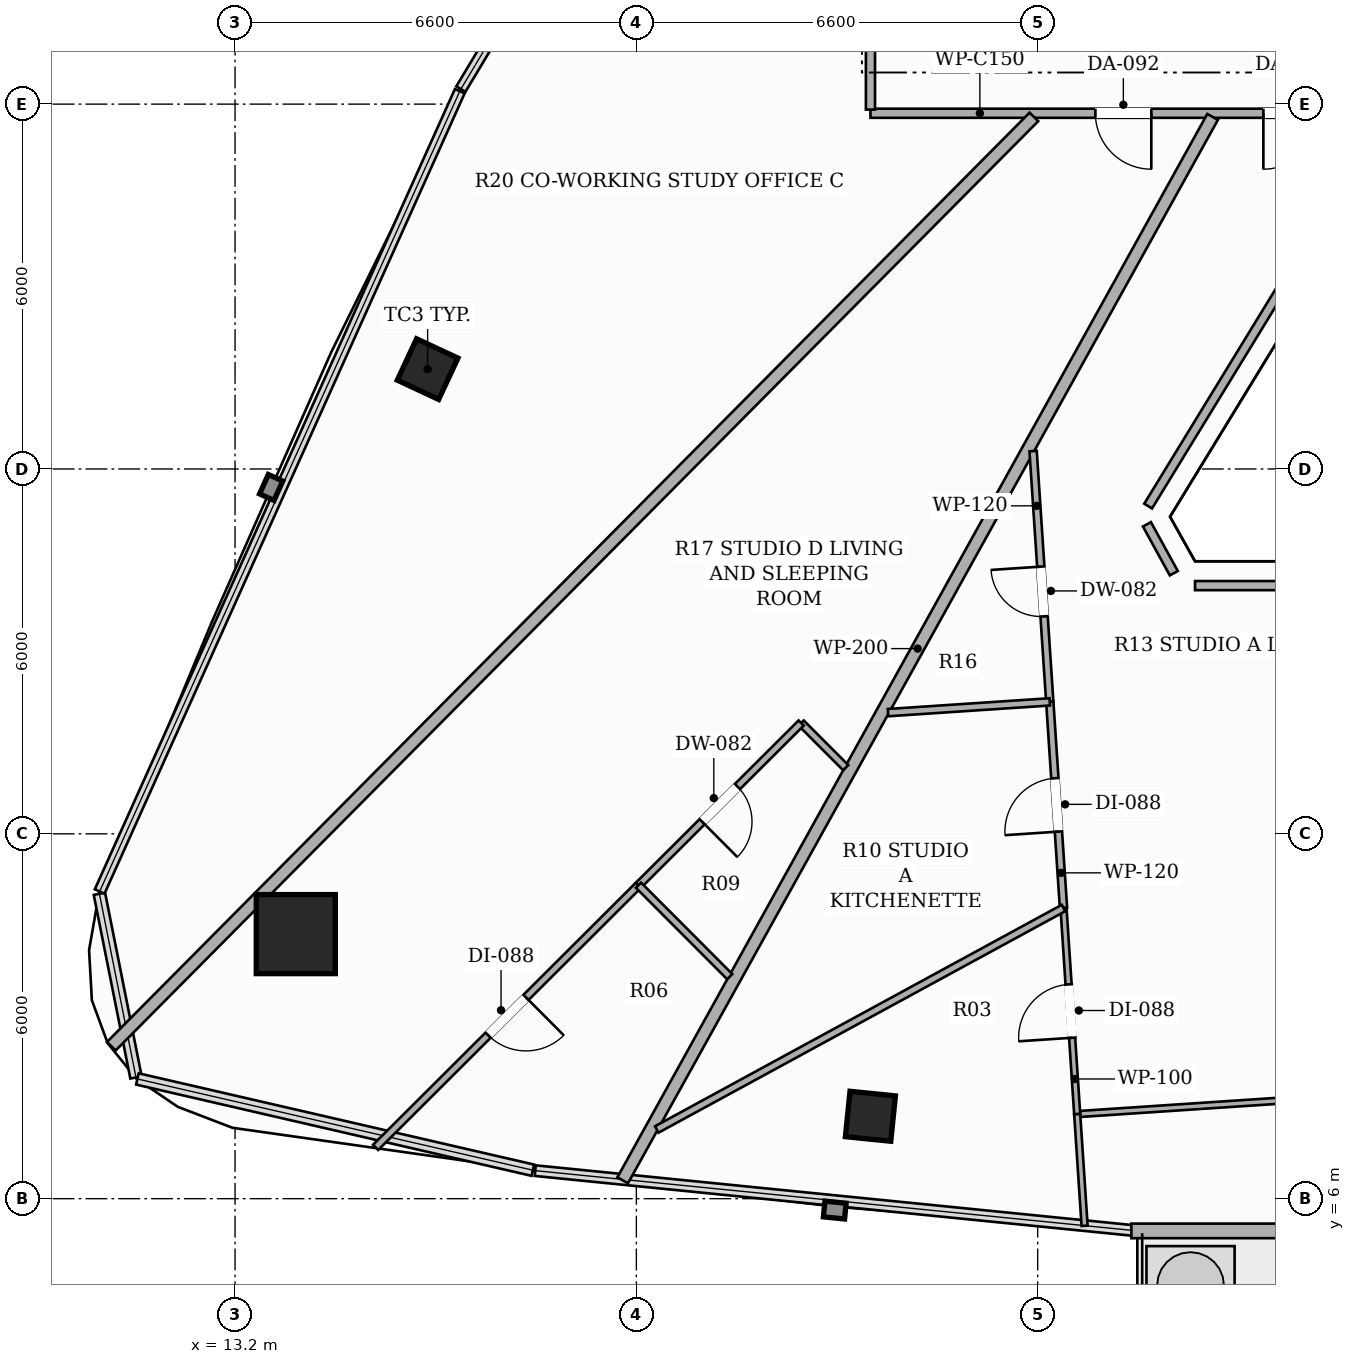
"""IFC4 building model, lengths in metres.
Left out: names, types, materials, properties, quantities, classifications, styles, units other than length and angle.
Written with IfcOpenShell. Run it as: python <this file> out.ifc"""

import sys

from ifc_helpers import new_model, si_unit, direction, frame, frame_2d, origin, origin_2d, place, context, subcontext, project, spatial, rectangle, hollow_rectangle, extrude, element, fill, save


model = new_model("IFC4")
c1 = context("Model", 3, precision=1e-05, world=origin(), true_north=direction((0.0, 1.0)))
c2 = subcontext(c1, "Body", "Model", "MODEL_VIEW")
j1 = project(units=[si_unit("LENGTHUNIT", "METRE"), si_unit("PLANEANGLEUNIT", "RADIAN")], contexts=[c1])
p1 = place(None, origin())
s1 = spatial("IfcSite", under=j1, at=p1, CompositionType="ELEMENT")
p2 = place(p1, origin())
s2 = spatial("IfcBuilding", under=s1, at=p2, CompositionType="ELEMENT")
p3 = place(p2, frame((0.0, 0.0, 253.55)))
s3 = spatial("IfcBuildingStorey", under=s2, at=p3, CompositionType="ELEMENT", Elevation=253.55)
p4 = place(p3, frame((14.199, 10.351, 0.0), z_axis=(0.0, 0.0, 1.0), x_axis=(1.0, 0.0, 0.0)))
e1 = element("IfcColumn", 1, at=p4, inside=s3, PredefinedType="COLUMN", context=c2, shape_type="SweptSolid", body=[
    extrude(hollow_rectangle(XDim=1.3, YDim=1.3, WallThickness=0.04, at=origin_2d()), origin(), (0.0, 0.0, 1.0), 3.3),
])
for number, where, z_axis, x_axis in (
    (2, (16.367, 19.642, 0.0), (0.0, 0.0, 1.0), (0.423, 0.906, 0.0)),
    (3, (23.649, 7.355, 0.0), (0.0, 0.0, 1.0), (-0.995, 0.101, 0.0)),
):
    element("IfcColumn", number, at=place(p3, frame(where, z_axis=z_axis, x_axis=x_axis)), inside=s3, PredefinedType="COLUMN", context=c2, shape_type="SweptSolid", body=[
        extrude(hollow_rectangle(XDim=0.75, YDim=0.75, WallThickness=0.025, at=origin_2d()), origin(), (0.0, 0.0, 1.0), 3.3),
    ])
p5 = place(p3, frame((27.941, 5.47, 0.0), z_axis=(0.0, 0.0, 1.0), x_axis=(1.0, 0.0, 0.0)))
e4 = element("IfcWall", 4, at=p5, inside=s3, PredefinedType="SOLIDWALL", context=c2, shape_type="SweptSolid", body=[
    extrude(rectangle(XDim=10.118, YDim=0.24, at=frame_2d((5.059, 0.0))), origin(), (0.0, 0.0, 1.0), 2.464),
])
p6 = place(p5, frame((7.62, 0.0, 0.0)))
e5 = element("IfcOpeningElement", 5, at=p6, cuts=e4, PredefinedType="OPENING", context=c2, shape_type="SweptSolid", body=[
    extrude(rectangle(XDim=1.8, YDim=2.2, at=frame_2d((0.9, 1.1))), frame((0.0, 0.13, 0.0), z_axis=(0.0, -1.0, 0.0), x_axis=(1.0, 0.0, 0.0)), (0.0, 0.0, 1.0), 0.26),
])
p7 = place(p3, frame((32.165, 23.85, 0.0), z_axis=(0.0, 0.0, 1.0), x_axis=(-1.0, 0.0, 0.0)))
e6 = element("IfcWall", 6, at=p7, inside=s3, PredefinedType="PARTITIONING", context=c2, shape_type="SweptSolid", body=[
    extrude(rectangle(XDim=8.515, YDim=0.15, at=frame_2d((4.258, 0.0))), origin(), (0.0, 0.0, 1.0), 2.405),
])
p8 = place(p7, frame((1.133, 0.0, 0.0)))
e7 = element("IfcOpeningElement", 7, at=p8, cuts=e6, PredefinedType="OPENING", context=c2, shape_type="SweptSolid", body=[
    extrude(rectangle(XDim=0.92, YDim=2.15, at=frame_2d((0.46, 1.075))), frame((0.0, 0.085, 0.0), z_axis=(0.0, -1.0, 0.0), x_axis=(1.0, 0.0, 0.0)), (0.0, 0.0, 1.0), 0.17),
])
p9 = place(p7, frame((3.896, 0.0, 0.0)))
e8 = element("IfcOpeningElement", 8, at=p9, cuts=e6, PredefinedType="OPENING", context=c2, shape_type="SweptSolid", body=[
    extrude(rectangle(XDim=0.92, YDim=2.15, at=frame_2d((0.46, 1.075))), frame((0.0, 0.085, 0.0), z_axis=(0.0, -1.0, 0.0), x_axis=(1.0, 0.0, 0.0)), (0.0, 0.0, 1.0), 0.17),
])
p10 = place(p3, frame((23.65, 23.91, 0.0), z_axis=(0.0, 0.0, 1.0), x_axis=(0.0, 1.0, 0.0)))
e9 = element("IfcWall", 9, at=p10, inside=s3, PredefinedType="PARTITIONING", context=c2, shape_type="SweptSolid", body=[
    extrude(rectangle(XDim=11.059, YDim=0.15, at=frame_2d((5.53, 0.0))), origin(), (0.0, 0.0, 1.0), 2.332),
])
p11 = place(p10, frame((5.09, 0.0, 0.0)))
e10 = element("IfcOpeningElement", 10, at=p11, cuts=e9, PredefinedType="OPENING", context=c2, shape_type="SweptSolid", body=[
    extrude(rectangle(XDim=0.88, YDim=2.1, at=frame_2d((0.44, 1.05))), frame((0.0, 0.085, 0.0), z_axis=(0.0, -1.0, 0.0), x_axis=(1.0, 0.0, 0.0)), (0.0, 0.0, 1.0), 0.17),
])
p12 = place(p3, frame((37.012, 16.082, 0.0), z_axis=(0.0, 0.0, 1.0), x_axis=(-1.0, 0.0, 0.0)))
e11 = element("IfcWall", 11, at=p12, inside=s3, PredefinedType="PARTITIONING", context=c2, shape_type="SweptSolid", body=[
    extrude(rectangle(XDim=8.024, YDim=0.15, at=frame_2d((4.012, 0.0))), origin(), (0.0, 0.0, 1.0), 2.613),
])
p13 = place(p3, frame((28.639, 16.286, 0.0), z_axis=(0.0, 0.0, 1.0), x_axis=(-0.481571453054, 0.876406832244, 0.0)))
e12 = element("IfcWall", 12, at=p13, inside=s3, PredefinedType="PARTITIONING", context=c2, shape_type="SweptSolid", body=[
    extrude(rectangle(XDim=0.918, YDim=0.15, at=frame_2d((0.459, 0.0))), origin(), (0.0, 0.0, 1.0), 2.9),
])
p14 = place(p3, frame((28.217, 17.39, 0.0), z_axis=(0.0, 0.0, 1.0), x_axis=(0.522011859837, 0.852938226479, 0.0)))
e13 = element("IfcWall", 13, at=p14, inside=s3, PredefinedType="PARTITIONING", context=c2, shape_type="SweptSolid", body=[
    extrude(rectangle(XDim=7.504, YDim=0.15, at=frame_2d((3.752, 0.0))), origin(), (0.0, 0.0, 1.0), 2.613),
])
p15 = place(p3, frame((19.575, 6.302, 0.0), z_axis=(0.0, 0.0, 1.0), x_axis=(0.485129783088, 0.874442161358, 0.0)))
e14 = element("IfcWall", 14, at=p15, inside=s3, PredefinedType="PARTITIONING", context=c2, shape_type="SweptSolid", body=[
    extrude(rectangle(XDim=19.999, YDim=0.2, at=frame_2d((10.0, 0.0))), origin(), (0.0, 0.0, 1.0), 2.332),
])
p16 = place(p3, frame((26.338, 23.79, 0.0), z_axis=(0.0, 0.0, 1.0), x_axis=(-0.70454576136, -0.70965855885, 0.0)))
e15 = element("IfcWall", 15, at=p16, inside=s3, PredefinedType="PARTITIONING", context=c2, shape_type="SweptSolid", body=[
    extrude(rectangle(XDim=21.536, YDim=0.2, at=frame_2d((10.768, 0.0))), origin(), (0.0, 0.0, 1.0), 2.332),
])
p17 = place(p3, frame((26.599, 14.17, 0.0), z_axis=(0.0, 0.0, 1.0), x_axis=(-0.066334744758, 0.997797425151, 0.0)))
e16 = element("IfcWall", 16, at=p17, inside=s3, PredefinedType="PARTITIONING", context=c2, shape_type="SweptSolid", body=[
    extrude(rectangle(XDim=4.133, YDim=0.12, at=frame_2d((2.066, 0.0))), origin(), (0.0, 0.0, 1.0), 2.613),
])
p18 = place(p17, frame((1.409, 0.0, 0.0)))
e17 = element("IfcOpeningElement", 17, at=p18, cuts=e16, PredefinedType="OPENING", context=c2, shape_type="SweptSolid", body=[
    extrude(rectangle(XDim=0.82, YDim=2.1, at=frame_2d((0.41, 1.05))), frame((0.0, 0.07, 0.0), z_axis=(0.0, -1.0, 0.0), x_axis=(1.0, 0.0, 0.0)), (0.0, 0.0, 1.0), 0.14),
])
p19 = place(p3, frame((26.825, 10.78, 0.0), z_axis=(0.0, 0.0, 1.0), x_axis=(-0.066471315173, 0.997788336402, 0.0)))
e18 = element("IfcWall", 18, at=p19, inside=s3, PredefinedType="PARTITIONING", context=c2, shape_type="SweptSolid", body=[
    extrude(rectangle(XDim=3.397, YDim=0.12, at=frame_2d((1.699, 0.0))), origin(), (0.0, 0.0, 1.0), 2.9),
])
p20 = place(p19, frame((1.259, 0.0, 0.0)))
e19 = element("IfcOpeningElement", 19, at=p20, cuts=e18, PredefinedType="OPENING", context=c2, shape_type="SweptSolid", body=[
    extrude(rectangle(XDim=0.88, YDim=2.1, at=frame_2d((0.44, 1.05))), frame((0.0, 0.07, 0.0), z_axis=(0.0, -1.0, 0.0), x_axis=(1.0, 0.0, 0.0)), (0.0, 0.0, 1.0), 0.14),
])
p21 = place(p3, frame((37.877, 8.11, 0.0), z_axis=(0.0, 0.0, 1.0), x_axis=(-0.997794804299, -0.066374155471, 0.0)))
e20 = element("IfcWall", 20, at=p21, inside=s3, PredefinedType="PARTITIONING", context=c2, shape_type="SweptSolid", body=[
    extrude(rectangle(XDim=10.851, YDim=0.1, at=frame_2d((5.425, 0.0))), origin(), (0.0, 0.0, 1.0), 2.332),
])
p22 = place(p21, frame((5.68, 0.0, 0.0)))
e21 = element("IfcOpeningElement", 21, at=p22, cuts=e20, PredefinedType="OPENING", context=c2, shape_type="SweptSolid", body=[
    extrude(rectangle(XDim=0.88, YDim=2.1, at=frame_2d((0.44, 1.05))), frame((0.0, 0.06, 0.0), z_axis=(0.0, -1.0, 0.0), x_axis=(1.0, 0.0, 0.0)), (0.0, 0.0, 1.0), 0.12),
])
p23 = place(p3, frame((27.05, 7.39, 0.0), z_axis=(0.0, 0.0, 1.0), x_axis=(-0.066251929929, 0.997802927326, 0.0)))
e22 = element("IfcWall", 22, at=p23, inside=s3, PredefinedType="PARTITIONING", context=c2, shape_type="SweptSolid", body=[
    extrude(rectangle(XDim=3.398, YDim=0.1, at=frame_2d((1.699, 0.0))), origin(), (0.0, 0.0, 1.0), 2.332),
])
p24 = place(p23, frame((1.259, 0.0, 0.0)))
e23 = element("IfcOpeningElement", 23, at=p24, cuts=e22, PredefinedType="OPENING", context=c2, shape_type="SweptSolid", body=[
    extrude(rectangle(XDim=0.88, YDim=2.1, at=frame_2d((0.44, 1.05))), frame((0.0, 0.06, 0.0), z_axis=(0.0, -1.0, 0.0), x_axis=(1.0, 0.0, 0.0)), (0.0, 0.0, 1.0), 0.12),
])
p25 = place(p3, frame((26.599, 14.17, 0.0), z_axis=(0.0, 0.0, 1.0), x_axis=(-0.99779365881, -0.066391373223, 0.0)))
e24 = element("IfcWall", 24, at=p25, inside=s3, PredefinedType="PARTITIONING", context=c2, shape_type="SweptSolid", body=[
    extrude(rectangle(XDim=2.666, YDim=0.12, at=frame_2d((1.333, 0.0))), origin(), (0.0, 0.0, 1.0), 2.613),
])
p26 = place(p3, frame((26.825, 10.78, 0.0), z_axis=(0.0, 0.0, 1.0), x_axis=(-0.87825059366, -0.478200684583, 0.0)))
e25 = element("IfcWall", 25, at=p26, inside=s3, PredefinedType="PARTITIONING", context=c2, shape_type="SweptSolid", body=[
    extrude(rectangle(XDim=7.616, YDim=0.12, at=frame_2d((3.808, 0.0))), origin(), (0.0, 0.0, 1.0), 2.332),
])
p27 = place(p3, frame((27.172, 5.554, 0.0), z_axis=(0.0, 0.0, 1.0), x_axis=(-0.066342877953, 0.997796884413, 0.0)))
e26 = element("IfcWall", 26, at=p27, inside=s3, PredefinedType="PARTITIONING", context=c2, shape_type="SweptSolid", body=[
    extrude(rectangle(XDim=1.84, YDim=0.1, at=frame_2d((0.92, 0.0))), origin(), (0.0, 0.0, 1.0), 2.332),
])
p28 = place(p3, frame((23.243, 13.088, 0.0), z_axis=(0.0, 0.0, 1.0), x_axis=(-0.706518163511, 0.707694909286, 0.0)))
e27 = element("IfcWall", 27, at=p28, inside=s3, PredefinedType="PARTITIONING", context=c2, shape_type="SweptSolid", body=[
    extrude(rectangle(XDim=1.037, YDim=0.12, at=frame_2d((0.519, 0.0))), origin(), (0.0, 0.0, 1.0), 2.9),
])
p29 = place(p3, frame((22.51, 13.822, 0.0), z_axis=(0.0, 0.0, 1.0), x_axis=(-0.708172404385, -0.706039549649, 0.0)))
e28 = element("IfcWall", 28, at=p29, inside=s3, PredefinedType="PARTITIONING", context=c2, shape_type="SweptSolid", body=[
    extrude(rectangle(XDim=3.777, YDim=0.12, at=frame_2d((1.889, 0.0))), origin(), (0.0, 0.0, 1.0), 2.613),
])
p30 = place(p29, frame((1.479, 0.0, 0.0)))
e29 = element("IfcOpeningElement", 29, at=p30, cuts=e28, PredefinedType="OPENING", context=c2, shape_type="SweptSolid", body=[
    extrude(rectangle(XDim=0.82, YDim=2.1, at=frame_2d((0.41, 1.05))), frame((0.0, 0.07, 0.0), z_axis=(0.0, -1.0, 0.0), x_axis=(1.0, 0.0, 0.0)), (0.0, 0.0, 1.0), 0.14),
])
p31 = place(p3, frame((19.835, 11.155, 0.0), z_axis=(0.0, 0.0, 1.0), x_axis=(-0.708085833798, -0.706126371108, 0.0)))
e30 = element("IfcWall", 30, at=p31, inside=s3, PredefinedType="PARTITIONING", context=c2, shape_type="SweptSolid", body=[
    extrude(rectangle(XDim=6.105, YDim=0.12, at=frame_2d((3.053, 0.0))), origin(), (0.0, 0.0, 1.0), 2.332),
])
p32 = place(p31, frame((2.613, 0.0, 0.0)))
e31 = element("IfcOpeningElement", 31, at=p32, cuts=e30, PredefinedType="OPENING", context=c2, shape_type="SweptSolid", body=[
    extrude(rectangle(XDim=0.88, YDim=2.1, at=frame_2d((0.44, 1.05))), frame((0.0, 0.07, 0.0), z_axis=(0.0, -1.0, 0.0), x_axis=(1.0, 0.0, 0.0)), (0.0, 0.0, 1.0), 0.14),
])
p33 = place(p3, frame((21.336, 9.651, 0.0), z_axis=(0.0, 0.0, 1.0), x_axis=(-0.70635958505, 0.707853188597, 0.0)))
e32 = element("IfcWall", 32, at=p33, inside=s3, PredefinedType="PARTITIONING", context=c2, shape_type="SweptSolid", body=[
    extrude(rectangle(XDim=2.125, YDim=0.12, at=frame_2d((1.062, 0.0))), origin(), (0.0, 0.0, 1.0), 2.613),
])
p34 = place(p8, origin())
e33 = element("IfcDoor", 33, at=p34, inside=s3, OperationType="SINGLE_SWING_RIGHT", PredefinedType="DOOR", context=c2, shape_type="SweptSolid", body=[
    extrude(rectangle(XDim=0.92, YDim=2.15, at=frame_2d((0.46, 1.075))), frame((0.0, 0.025, 0.0), z_axis=(0.0, -1.0, 0.0), x_axis=(1.0, 0.0, 0.0)), (0.0, 0.0, 1.0), 0.05),
])
fill(e7, e33)
p35 = place(p18, origin())
e34 = element("IfcDoor", 34, at=p35, inside=s3, OperationType="SINGLE_SWING_RIGHT", PredefinedType="DOOR", context=c2, shape_type="SweptSolid", body=[
    extrude(rectangle(XDim=0.82, YDim=2.1, at=frame_2d((0.41, 1.05))), frame((0.0, 0.025, 0.0), z_axis=(0.0, -1.0, 0.0), x_axis=(1.0, 0.0, 0.0)), (0.0, 0.0, 1.0), 0.05),
])
fill(e17, e34)
p36 = place(p20, origin())
e35 = element("IfcDoor", 35, at=p36, inside=s3, OperationType="SINGLE_SWING_LEFT", PredefinedType="DOOR", context=c2, shape_type="SweptSolid", body=[
    extrude(rectangle(XDim=0.88, YDim=2.1, at=frame_2d((0.44, 1.05))), frame((0.0, 0.025, 0.0), z_axis=(0.0, -1.0, 0.0), x_axis=(1.0, 0.0, 0.0)), (0.0, 0.0, 1.0), 0.05),
])
fill(e19, e35)
p37 = place(p24, origin())
e36 = element("IfcDoor", 36, at=p37, inside=s3, OperationType="SINGLE_SWING_LEFT", PredefinedType="DOOR", context=c2, shape_type="SweptSolid", body=[
    extrude(rectangle(XDim=0.88, YDim=2.1, at=frame_2d((0.44, 1.05))), frame((0.0, 0.025, 0.0), z_axis=(0.0, -1.0, 0.0), x_axis=(1.0, 0.0, 0.0)), (0.0, 0.0, 1.0), 0.05),
])
fill(e23, e36)
p38 = place(p9, origin())
e37 = element("IfcDoor", 37, at=p38, inside=s3, OperationType="SINGLE_SWING_LEFT", PredefinedType="DOOR", context=c2, shape_type="SweptSolid", body=[
    extrude(rectangle(XDim=0.92, YDim=2.15, at=frame_2d((0.46, 1.075))), frame((0.0, 0.025, 0.0), z_axis=(0.0, -1.0, 0.0), x_axis=(1.0, 0.0, 0.0)), (0.0, 0.0, 1.0), 0.05),
])
fill(e8, e37)
p39 = place(p30, origin())
e38 = element("IfcDoor", 38, at=p39, inside=s3, OperationType="SINGLE_SWING_RIGHT", PredefinedType="DOOR", context=c2, shape_type="SweptSolid", body=[
    extrude(rectangle(XDim=0.82, YDim=2.1, at=frame_2d((0.41, 1.05))), frame((0.0, 0.025, 0.0), z_axis=(0.0, -1.0, 0.0), x_axis=(1.0, 0.0, 0.0)), (0.0, 0.0, 1.0), 0.05),
])
fill(e29, e38)
p40 = place(p32, origin())
e39 = element("IfcDoor", 39, at=p40, inside=s3, OperationType="SINGLE_SWING_LEFT", PredefinedType="DOOR", context=c2, shape_type="SweptSolid", body=[
    extrude(rectangle(XDim=0.88, YDim=2.1, at=frame_2d((0.44, 1.05))), frame((0.0, 0.025, 0.0), z_axis=(0.0, -1.0, 0.0), x_axis=(1.0, 0.0, 0.0)), (0.0, 0.0, 1.0), 0.05),
])
fill(e31, e39)
save(model, sys.argv[1])
